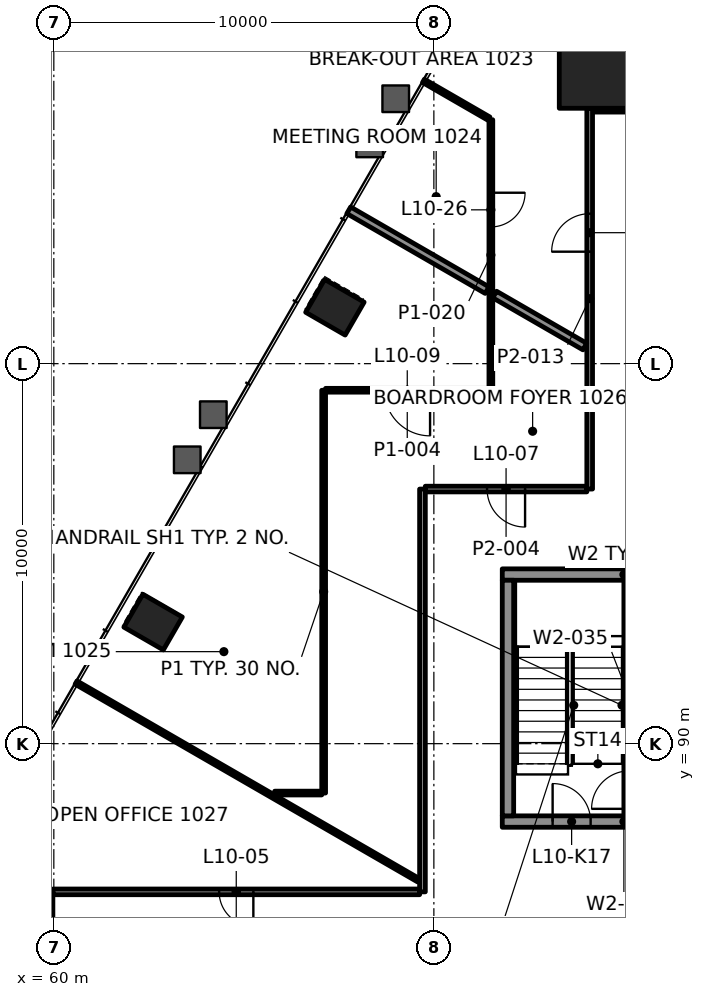
"""IFC4 building model, lengths in metres.
Left out: names, types, materials, properties, quantities, classifications, styles, units other than length and angle.
Written with IfcOpenShell. Run it as: python <this file> out.ifc"""

import sys

from ifc_helpers import new_model, si_unit, direction, frame, frame_2d, origin, origin_2d, place, context, subcontext, project, spatial, rectangle, extrude, element, fill, save


model = new_model("IFC4")
c1 = context("Model", 3, precision=1e-05, world=origin(), true_north=direction((0.0, 1.0)))
c2 = subcontext(c1, "Body", "Model", "MODEL_VIEW")
j1 = project(units=[si_unit("LENGTHUNIT", "METRE"), si_unit("PLANEANGLEUNIT", "RADIAN")], contexts=[c1])
p1 = place(None, origin())
s1 = spatial("IfcSite", under=j1, at=p1, CompositionType="ELEMENT")
p2 = place(p1, origin())
s2 = spatial("IfcBuilding", under=s1, at=p2, CompositionType="ELEMENT")
p3 = place(p2, frame((0.0, 0.0, 48.4)))
s3 = spatial("IfcBuildingStorey", under=s2, at=p3, CompositionType="ELEMENT", Elevation=48.4)
p4 = place(p3, frame((75.0, 108.42, 0.0), z_axis=(0.0, 0.0, 1.0), x_axis=(-1.0, 0.0, 0.0)))
e1 = element("IfcColumn", 1, at=p4, inside=s3, PredefinedType="COLUMN", context=c2, shape_type="SweptSolid", body=[
    extrude(rectangle(XDim=3.4, YDim=3.4, at=origin_2d()), origin(), (0.0, 0.0, 1.0), 4.2),
])
for number, where, z_axis, x_axis in (
    (2, (67.396, 101.485, -0.0), (0.0, 0.0, 1.0), (-0.5, -0.866, 0.0)),
    (3, (62.612, 93.199, -0.0), (0.0, 0.0, 1.0), (-0.5, -0.866, 0.0)),
):
    element("IfcColumn", number, at=place(p3, frame(where, z_axis=z_axis, x_axis=x_axis)), inside=s3, PredefinedType="COLUMN", context=c2, shape_type="SweptSolid", body=[
        extrude(rectangle(XDim=1.0, YDim=1.2, at=origin_2d()), origin(), (0.0, 0.0, 1.0), 4.2),
    ])
p5 = place(p3, frame((71.8, 87.95, 0.0), z_axis=(0.0, 0.0, 1.0), x_axis=(1.0, 0.0, 0.0)))
e4 = element("IfcWall", 4, at=p5, inside=s3, PredefinedType="SHEAR", context=c2, shape_type="SweptSolid", body=[
    extrude(rectangle(XDim=6.4, YDim=0.3, at=frame_2d((3.2, 0.0))), origin(), (0.0, 0.0, 1.0), 4.0),
])
p6 = place(p5, frame((1.325, 0.0, 0.0)))
e5 = element("IfcOpeningElement", 5, at=p6, cuts=e4, PredefinedType="OPENING", context=c2, shape_type="SweptSolid", body=[
    extrude(rectangle(XDim=1.0, YDim=2.1, at=frame_2d((0.5, 1.05))), frame((0.0, 0.16, 0.0), z_axis=(0.0, -1.0, 0.0), x_axis=(1.0, 0.0, 0.0)), (0.0, 0.0, 1.0), 0.32),
])
p7 = place(p5, frame((4.125, 0.0, 0.0)))
e6 = element("IfcOpeningElement", 6, at=p7, cuts=e4, PredefinedType="OPENING", context=c2, shape_type="SweptSolid", body=[
    extrude(rectangle(XDim=1.2, YDim=2.1, at=frame_2d((0.6, 1.05))), frame((0.0, 0.16, 0.0), z_axis=(0.0, -1.0, 0.0), x_axis=(1.0, 0.0, 0.0)), (0.0, 0.0, 1.0), 0.32),
])
p8 = place(p3, frame((71.8, 94.45, 0.0), z_axis=(0.0, 0.0, 1.0), x_axis=(1.0, 0.0, 0.0)))
e7 = element("IfcWall", 7, at=p8, inside=s3, PredefinedType="SHEAR", context=c2, shape_type="SweptSolid", body=[
    extrude(rectangle(XDim=6.4, YDim=0.3, at=frame_2d((3.2, 0.0))), origin(), (0.0, 0.0, 1.0), 4.0),
])
p9 = place(p3, frame((71.95, 88.1, 0.0), z_axis=(0.0, 0.0, 1.0), x_axis=(0.0, 1.0, 0.0)))
e8 = element("IfcWall", 8, at=p9, inside=s3, PredefinedType="SHEAR", context=c2, shape_type="SweptSolid", body=[
    extrude(rectangle(XDim=6.2, YDim=0.3, at=frame_2d((3.1, 0.0))), origin(), (0.0, 0.0, 1.0), 4.0),
])
p10 = place(p3, frame((75.15, 88.1, 0.0), z_axis=(0.0, 0.0, 1.0), x_axis=(0.0, 1.0, 0.0)))
e9 = element("IfcWall", 9, at=p10, inside=s3, PredefinedType="SHEAR", context=c2, shape_type="SweptSolid", body=[
    extrude(rectangle(XDim=6.2, YDim=0.3, at=frame_2d((3.1, 0.0))), origin(), (0.0, 0.0, 1.0), 4.0),
])
p11 = place(p10, frame((0.185, 0.0, 0.0)))
e10 = element("IfcOpeningElement", 10, at=p11, cuts=e9, PredefinedType="OPENING", context=c2, shape_type="SweptSolid", body=[
    extrude(rectangle(XDim=1.0, YDim=2.1, at=frame_2d((0.5, 1.05))), frame((0.0, 0.16, 0.0), z_axis=(0.0, -1.0, 0.0), x_axis=(1.0, 0.0, 0.0)), (0.0, 0.0, 1.0), 0.32),
])
p12 = place(p3, frame((69.625, 86.1, 0.0), z_axis=(0.0, 0.0, 1.0), x_axis=(-1.0, 0.0, 0.0)))
e11 = element("IfcWall", 11, at=p12, inside=s3, PredefinedType="PARTITIONING", context=c2, shape_type="SweptSolid", body=[
    extrude(rectangle(XDim=9.649, YDim=0.15, at=frame_2d((4.825, 0.0))), origin(), (0.0, 0.0, 1.0), 3.4),
])
p13 = place(p12, frame((4.375, 0.0, 0.0)))
e12 = element("IfcOpeningElement", 12, at=p13, cuts=e11, PredefinedType="OPENING", context=c2, shape_type="SweptSolid", body=[
    extrude(rectangle(XDim=0.9, YDim=2.1, at=frame_2d((0.45, 1.05))), frame((0.0, 0.085, 0.0), z_axis=(0.0, -1.0, 0.0), x_axis=(1.0, 0.0, 0.0)), (0.0, 0.0, 1.0), 0.17),
])
p14 = place(p3, frame((65.812, 88.7, 0.0), z_axis=(0.0, 0.0, 1.0), x_axis=(1.0, 0.0, 0.0)))
e13 = element("IfcWall", 13, at=p14, inside=s3, PredefinedType="PARTITIONING", context=c2, shape_type="SweptSolid", body=[
    extrude(rectangle(XDim=1.238, YDim=0.1, at=frame_2d((0.619, 0.0))), origin(), (0.0, 0.0, 1.0), 3.4),
])
p15 = place(p3, frame((74.025, 96.7, 0.0), z_axis=(0.0, 0.0, 1.0), x_axis=(-1.0, 0.0, 0.0)))
e14 = element("IfcWall", 14, at=p15, inside=s3, PredefinedType="PARTITIONING", context=c2, shape_type="SweptSolid", body=[
    extrude(rectangle(XDim=4.25, YDim=0.15, at=frame_2d((2.125, 0.0))), origin(), (0.0, 0.0, 1.0), 3.4),
])
p16 = place(p15, frame((1.625, 0.0, 0.0)))
e15 = element("IfcOpeningElement", 15, at=p16, cuts=e14, PredefinedType="OPENING", context=c2, shape_type="SweptSolid", body=[
    extrude(rectangle(XDim=1.0, YDim=2.1, at=frame_2d((0.5, 1.05))), frame((0.0, 0.085, 0.0), z_axis=(0.0, -1.0, 0.0), x_axis=(1.0, 0.0, 0.0)), (0.0, 0.0, 1.0), 0.17),
])
p17 = place(p3, frame((71.45, 99.3, 0.0), z_axis=(0.0, 0.0, 1.0), x_axis=(-1.0, 0.0, 0.0)))
e16 = element("IfcWall", 16, at=p17, inside=s3, PredefinedType="PARTITIONING", context=c2, shape_type="SweptSolid", body=[
    extrude(rectangle(XDim=4.3, YDim=0.1, at=frame_2d((2.15, 0.0))), origin(), (0.0, 0.0, 1.0), 3.4),
])
p18 = place(p17, frame((1.55, 0.0, 0.0)))
e17 = element("IfcOpeningElement", 17, at=p18, cuts=e16, PredefinedType="OPENING", context=c2, shape_type="SweptSolid", body=[
    extrude(rectangle(XDim=1.2, YDim=2.1, at=frame_2d((0.6, 1.05))), frame((0.0, 0.06, 0.0), z_axis=(0.0, -1.0, 0.0), x_axis=(1.0, 0.0, 0.0)), (0.0, 0.0, 1.0), 0.12),
])
p19 = place(p3, frame((74.176, 106.72, 0.0), z_axis=(0.0, 0.0, 1.0), x_axis=(1.0, 0.0, 0.0)))
e18 = element("IfcWall", 18, at=p19, inside=s3, PredefinedType="PARTITIONING", context=c2, shape_type="SweptSolid", body=[
    extrude(rectangle(XDim=1.649, YDim=0.2, at=frame_2d((0.825, 0.0))), origin(), (0.0, 0.0, 1.0), 3.397),
])
p20 = place(p3, frame((74.1, 96.7, 0.0), z_axis=(0.0, 0.0, 1.0), x_axis=(0.0, 1.0, 0.0)))
e19 = element("IfcWall", 19, at=p20, inside=s3, PredefinedType="PARTITIONING", context=c2, shape_type="SweptSolid", body=[
    extrude(rectangle(XDim=10.02, YDim=0.15, at=frame_2d((5.01, 0.0))), origin(), (0.0, 0.0, 1.0), 3.4),
])
p21 = place(p20, frame((6.246, 0.0, 0.0)))
e20 = element("IfcOpeningElement", 20, at=p21, cuts=e19, PredefinedType="OPENING", context=c2, shape_type="SweptSolid", body=[
    extrude(rectangle(XDim=1.0, YDim=2.1, at=frame_2d((0.5, 1.05))), frame((0.0, 0.085, 0.0), z_axis=(0.0, -1.0, 0.0), x_axis=(1.0, 0.0, 0.0)), (0.0, 0.0, 1.0), 0.17),
])
p22 = place(p3, frame((71.5, 106.418, 0.0), z_axis=(0.0, 0.0, 1.0), x_axis=(0.0, -1.0, 0.0)))
e21 = element("IfcWall", 21, at=p22, inside=s3, PredefinedType="PARTITIONING", context=c2, shape_type="SweptSolid", body=[
    extrude(rectangle(XDim=7.118, YDim=0.1, at=frame_2d((3.559, 0.0))), origin(), (0.0, 0.0, 1.0), 3.4),
])
p23 = place(p22, frame((1.921, 0.0, 0.0)))
e22 = element("IfcOpeningElement", 22, at=p23, cuts=e21, PredefinedType="OPENING", context=c2, shape_type="SweptSolid", body=[
    extrude(rectangle(XDim=0.9, YDim=2.1, at=frame_2d((0.45, 1.05))), frame((0.0, 0.06, 0.0), z_axis=(0.0, -1.0, 0.0), x_axis=(1.0, 0.0, 0.0)), (0.0, 0.0, 1.0), 0.12),
])
p24 = place(p3, frame((69.7, 86.1, 0.0), z_axis=(0.0, 0.0, 1.0), x_axis=(0.0, 1.0, 0.0)))
e23 = element("IfcWall", 23, at=p24, inside=s3, PredefinedType="PARTITIONING", context=c2, shape_type="SweptSolid", body=[
    extrude(rectangle(XDim=10.6, YDim=0.15, at=frame_2d((5.3, 0.0))), origin(), (0.0, 0.0, 1.0), 3.4),
])
p25 = place(p3, frame((67.1, 88.7, 0.0), z_axis=(0.0, 0.0, 1.0), x_axis=(0.0, 1.0, 0.0)))
e24 = element("IfcWall", 24, at=p25, inside=s3, PredefinedType="PARTITIONING", context=c2, shape_type="SweptSolid", body=[
    extrude(rectangle(XDim=10.6, YDim=0.1, at=frame_2d((5.3, 0.0))), origin(), (0.0, 0.0, 1.0), 3.4),
])
p26 = place(p3, frame((59.9, 67.321, 0.0), z_axis=(0.0, 0.0, 1.0), x_axis=(0.0, 1.0, 0.0)))
e25 = element("IfcWall", 25, at=p26, inside=s3, PredefinedType="PARTITIONING", context=c2, shape_type="SweptSolid", body=[
    extrude(rectangle(XDim=18.778, YDim=0.15, at=frame_2d((9.389, 0.0))), origin(), (0.0, 0.0, 1.0), 3.4),
])
p27 = place(p26, frame((3.519, 0.0, 0.0)))
e26 = element("IfcOpeningElement", 26, at=p27, cuts=e25, PredefinedType="OPENING", context=c2, shape_type="SweptSolid", body=[
    extrude(rectangle(XDim=0.9, YDim=2.1, at=frame_2d((0.45, 1.05))), frame((0.0, 0.085, 0.0), z_axis=(0.0, -1.0, 0.0), x_axis=(1.0, 0.0, 0.0)), (0.0, 0.0, 1.0), 0.17),
])
p28 = place(p26, frame((6.281, 0.0, 0.0)))
e27 = element("IfcOpeningElement", 27, at=p28, cuts=e25, PredefinedType="OPENING", context=c2, shape_type="SweptSolid", body=[
    extrude(rectangle(XDim=0.9, YDim=2.1, at=frame_2d((0.45, 1.05))), frame((0.0, 0.085, 0.0), z_axis=(0.0, -1.0, 0.0), x_axis=(1.0, 0.0, 0.0)), (0.0, 0.0, 1.0), 0.17),
])
p29 = place(p26, frame((9.042, 0.0, 0.0)))
e28 = element("IfcOpeningElement", 28, at=p29, cuts=e25, PredefinedType="OPENING", context=c2, shape_type="SweptSolid", body=[
    extrude(rectangle(XDim=0.9, YDim=2.1, at=frame_2d((0.45, 1.05))), frame((0.0, 0.085, 0.0), z_axis=(0.0, -1.0, 0.0), x_axis=(1.0, 0.0, 0.0)), (0.0, 0.0, 1.0), 0.17),
])
p30 = place(p3, frame((71.45, 106.447, 0.0), z_axis=(0.0, 0.0, 1.0), x_axis=(-0.866022120267, 0.500005687176, 0.0)))
e29 = element("IfcWall", 29, at=p30, inside=s3, PredefinedType="PARTITIONING", context=c2, shape_type="SweptSolid", body=[
    extrude(rectangle(XDim=1.99, YDim=0.1, at=frame_2d((0.995, 0.0))), origin(), (0.0, 0.0, 1.0), 3.4),
])
p31 = place(p3, frame((73.973, 100.449, 0.0), z_axis=(0.0, 0.0, 1.0), x_axis=(-0.866035715982, 0.499982138324, 0.0)))
e30 = element("IfcWall", 30, at=p31, inside=s3, PredefinedType="PARTITIONING", context=c2, shape_type="SweptSolid", body=[
    extrude(rectangle(XDim=2.74, YDim=0.2, at=frame_2d((1.37, 0.0))), origin(), (0.0, 0.0, 1.0), 3.4),
])
p32 = place(p3, frame((69.599, 86.404, 0.0), z_axis=(0.0, 0.0, 1.0), x_axis=(-0.866034815185, 0.499983698621, 0.0)))
e31 = element("IfcWall", 31, at=p32, inside=s3, PredefinedType="PARTITIONING", context=c2, shape_type="SweptSolid", body=[
    extrude(rectangle(XDim=10.408, YDim=0.1, at=frame_2d((5.204, 0.0))), origin(), (0.0, 0.0, 1.0), 3.165),
])
p33 = place(p3, frame((71.4, 101.935, 0.0), z_axis=(0.0, 0.0, 1.0), x_axis=(-0.866003715822, 0.500037562771, 0.0)))
e32 = element("IfcWall", 32, at=p33, inside=s3, PredefinedType="PARTITIONING", context=c2, shape_type="SweptSolid", body=[
    extrude(rectangle(XDim=4.203, YDim=0.2, at=frame_2d((2.102, 0.0))), origin(), (0.0, 0.0, 1.0), 3.4),
])
p34 = place(p13, origin())
e33 = element("IfcDoor", 33, at=p34, inside=s3, OperationType="SINGLE_SWING_LEFT", PredefinedType="DOOR", context=c2, shape_type="SweptSolid", body=[
    extrude(rectangle(XDim=0.9, YDim=2.1, at=frame_2d((0.45, 1.05))), frame((0.0, 0.025, 0.0), z_axis=(0.0, -1.0, 0.0), x_axis=(1.0, 0.0, 0.0)), (0.0, 0.0, 1.0), 0.05),
])
fill(e12, e33)
p35 = place(p16, origin())
e34 = element("IfcDoor", 34, at=p35, inside=s3, OperationType="SINGLE_SWING_RIGHT", PredefinedType="DOOR", context=c2, shape_type="SweptSolid", body=[
    extrude(rectangle(XDim=1.0, YDim=2.1, at=frame_2d((0.5, 1.05))), frame((0.0, 0.025, 0.0), z_axis=(0.0, -1.0, 0.0), x_axis=(1.0, 0.0, 0.0)), (0.0, 0.0, 1.0), 0.05),
])
fill(e15, e34)
p36 = place(p18, origin())
e35 = element("IfcDoor", 35, at=p36, inside=s3, OperationType="DOUBLE_DOOR_SINGLE_SWING", PredefinedType="DOOR", context=c2, shape_type="SweptSolid", body=[
    extrude(rectangle(XDim=1.2, YDim=2.1, at=frame_2d((0.6, 1.05))), frame((0.0, 0.025, 0.0), z_axis=(0.0, -1.0, 0.0), x_axis=(1.0, 0.0, 0.0)), (0.0, 0.0, 1.0), 0.05),
])
fill(e17, e35)
p37 = place(p21, origin())
e36 = element("IfcDoor", 36, at=p37, inside=s3, OperationType="SINGLE_SWING_RIGHT", PredefinedType="DOOR", context=c2, shape_type="SweptSolid", body=[
    extrude(rectangle(XDim=1.0, YDim=2.1, at=frame_2d((0.5, 1.05))), frame((0.0, 0.025, 0.0), z_axis=(0.0, -1.0, 0.0), x_axis=(1.0, 0.0, 0.0)), (0.0, 0.0, 1.0), 0.05),
])
fill(e20, e36)
p38 = place(p23, origin())
e37 = element("IfcDoor", 37, at=p38, inside=s3, OperationType="SINGLE_SWING_RIGHT", PredefinedType="DOOR", context=c2, shape_type="SweptSolid", body=[
    extrude(rectangle(XDim=0.9, YDim=2.1, at=frame_2d((0.45, 1.05))), frame((0.0, 0.025, 0.0), z_axis=(0.0, -1.0, 0.0), x_axis=(1.0, 0.0, 0.0)), (0.0, 0.0, 1.0), 0.05),
])
fill(e22, e37)
p39 = place(p6, origin())
e38 = element("IfcDoor", 38, at=p39, inside=s3, OperationType="SINGLE_SWING_RIGHT", PredefinedType="DOOR", context=c2, shape_type="SweptSolid", body=[
    extrude(rectangle(XDim=1.0, YDim=2.1, at=frame_2d((0.5, 1.05))), frame((0.0, 0.025, 0.0), z_axis=(0.0, -1.0, 0.0), x_axis=(1.0, 0.0, 0.0)), (0.0, 0.0, 1.0), 0.05),
])
fill(e5, e38)
save(model, sys.argv[1])
